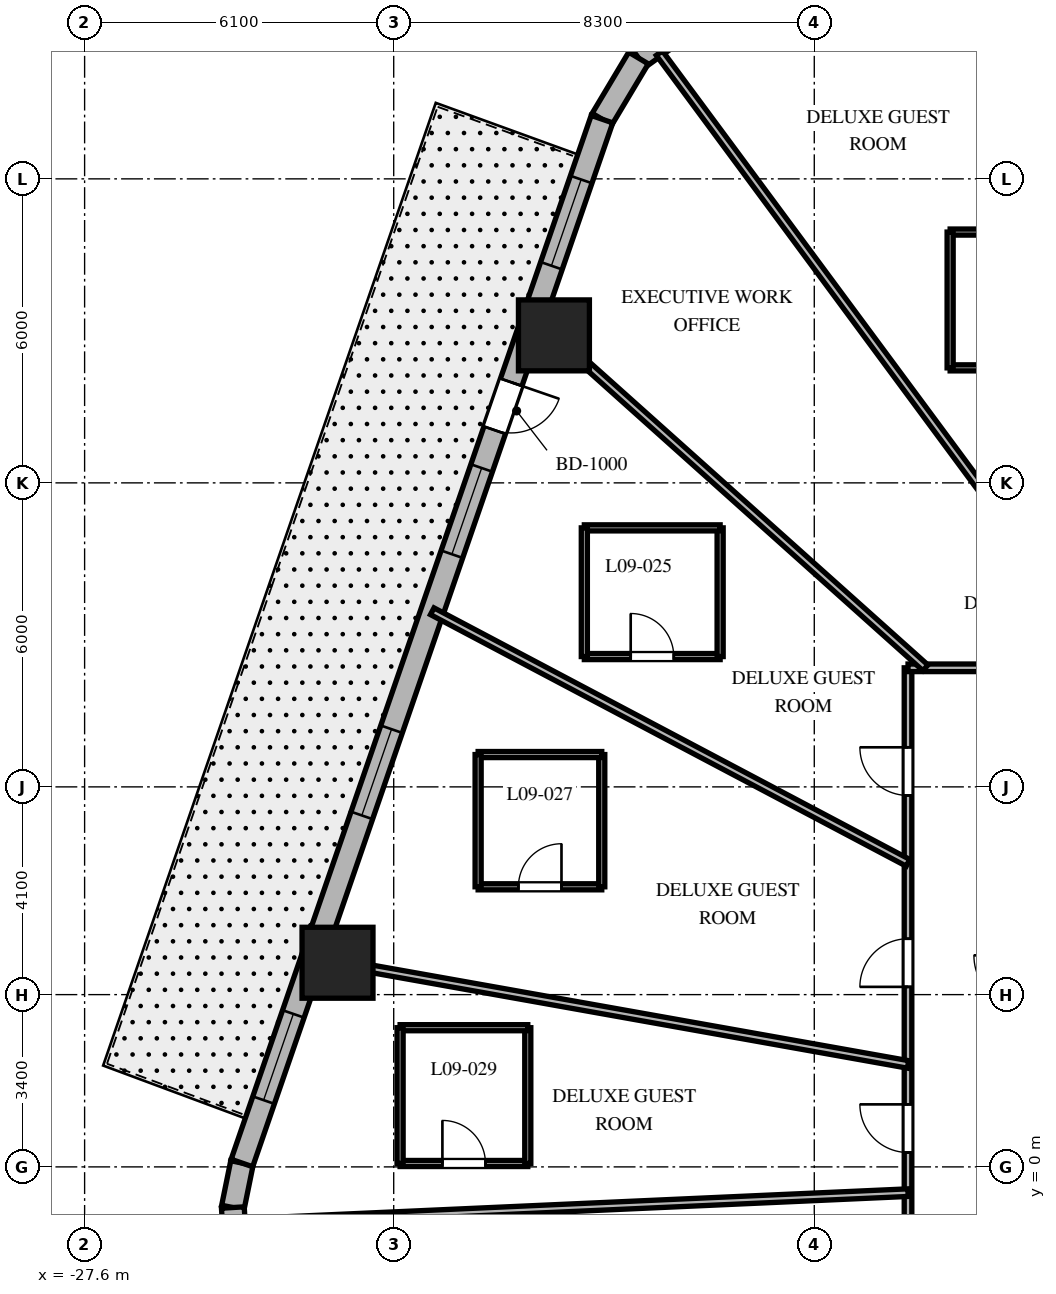
"""IFC4 building model, lengths in metres.
Left out: names, types, materials, properties, quantities, classifications, styles, units other than length and angle.
Written with IfcOpenShell. Run it as: python <this file> out.ifc"""

import sys

from ifc_helpers import new_model, si_unit, direction, frame, frame_2d, origin, origin_2d, place, context, subcontext, project, spatial, rectangle, extrude, element, fill, save


model = new_model("IFC4")
c1 = context("Model", 3, precision=1e-05, world=origin(), true_north=direction((0.0, 1.0)))
c2 = subcontext(c1, "Body", "Model", "MODEL_VIEW")
j1 = project(units=[si_unit("LENGTHUNIT", "METRE"), si_unit("PLANEANGLEUNIT", "RADIAN")], contexts=[c1])
p1 = place(None, origin())
s1 = spatial("IfcSite", under=j1, at=p1, CompositionType="ELEMENT")
p2 = place(p1, origin())
s2 = spatial("IfcBuilding", under=s1, at=p2, CompositionType="ELEMENT")
p3 = place(p2, frame((0.0, 0.0, 45.3)))
s3 = spatial("IfcBuildingStorey", under=s2, at=p3, CompositionType="ELEMENT", Elevation=45.3)
for number, where, z_axis, x_axis in (
    (1, (-18.338, 16.411, 0.0), (0.0, 0.0, 1.0), (1.0, 0.0, 0.0)),
    (2, (-22.609, 4.029, 0.0), (0.0, 0.0, 1.0), (1.0, 0.0, 0.0)),
):
    element("IfcColumn", number, at=place(p3, frame(where, z_axis=z_axis, x_axis=x_axis)), inside=s3, PredefinedType="COLUMN", context=c2, shape_type="SweptSolid", body=[
        extrude(rectangle(XDim=1.4, YDim=1.4, at=origin_2d()), origin(), (0.0, 0.0, 1.0), 3.7),
    ])
p4 = place(p3, frame((-15.544, 22.687, 0.0), z_axis=(0.0, 0.0, 1.0), x_axis=(-0.814210854316, -0.580569276412, 0.0)))
e3 = element("IfcWall", 3, at=p4, inside=s3, PredefinedType="SOLIDWALL", context=c2, shape_type="SweptSolid", body=[
    extrude(rectangle(XDim=1.381, YDim=0.45, at=frame_2d((0.691, 0.0))), origin(), (0.0, 0.0, 1.0), 3.4),
])
p5 = place(p3, frame((-16.669, 21.885, 0.0), z_axis=(0.0, 0.0, 1.0), x_axis=(-0.512936712947, -0.858426425799, 0.0)))
e4 = element("IfcWall", 4, at=p5, inside=s3, PredefinedType="SOLIDWALL", context=c2, shape_type="SweptSolid", body=[
    extrude(rectangle(XDim=1.406, YDim=0.45, at=frame_2d((0.703, 0.0))), origin(), (0.0, 0.0, 1.0), 3.4),
])
p6 = place(p3, frame((-24.496, 0.077, 0.0), z_axis=(0.0, 0.0, 1.0), x_axis=(-0.199570594521, -0.979883451132, 0.0)))
e5 = element("IfcWall", 5, at=p6, inside=s3, PredefinedType="SOLIDWALL", context=c2, shape_type="SweptSolid", body=[
    extrude(rectangle(XDim=0.897, YDim=0.45, at=frame_2d((0.448, 0.0))), origin(), (0.0, 0.0, 1.0), 3.4),
])
p7 = place(p3, frame((-24.675, -0.802, 0.0), z_axis=(0.0, 0.0, 1.0), x_axis=(0.061188874166, -0.998126205286, 0.0)))
e6 = element("IfcWall", 6, at=p7, inside=s3, PredefinedType="SOLIDWALL", context=c2, shape_type="SweptSolid", body=[
    extrude(rectangle(XDim=0.882, YDim=0.45, at=frame_2d((0.441, 0.0))), origin(), (0.0, 0.0, 1.0), 3.4),
])
p8 = place(p3, frame((-17.39, 20.678, 0.0), z_axis=(0.0, 0.0, 1.0), x_axis=(-0.326068018294, -0.945346310854, 0.0)))
e7 = element("IfcWall", 7, at=p8, inside=s3, PredefinedType="SOLIDWALL", context=c2, shape_type="SweptSolid", body=[
    extrude(rectangle(XDim=21.793, YDim=0.45, at=frame_2d((10.896, 0.0))), origin(), (0.0, 0.0, 1.0), 3.4),
])
p9 = place(p8, frame((5.493, 0.0, 0.0)))
e8 = element("IfcOpeningElement", 8, at=p9, cuts=e7, PredefinedType="OPENING", context=c2, shape_type="SweptSolid", body=[
    extrude(rectangle(XDim=1.0, YDim=2.15, at=frame_2d((0.5, 1.075))), frame((0.0, 0.235, 0.0), z_axis=(0.0, -1.0, 0.0), x_axis=(1.0, 0.0, 0.0)), (0.0, 0.0, 1.0), 0.47),
])
p10 = place(p8, frame((1.26, 0.0, 0.8)))
e9 = element("IfcOpeningElement", 9, at=p10, cuts=e7, PredefinedType="OPENING", context=c2, shape_type="SweptSolid", body=[
    extrude(rectangle(XDim=1.8, YDim=1.8, at=frame_2d((0.9, 0.9))), frame((0.0, 0.235, 0.0), z_axis=(0.0, -1.0, 0.0), x_axis=(1.0, 0.0, 0.0)), (0.0, 0.0, 1.0), 0.47),
])
p11 = place(p8, frame((7.283, 0.0, 0.8)))
e10 = element("IfcOpeningElement", 10, at=p11, cuts=e7, PredefinedType="OPENING", context=c2, shape_type="SweptSolid", body=[
    extrude(rectangle(XDim=1.8, YDim=1.8, at=frame_2d((0.9, 0.9))), frame((0.0, 0.235, 0.0), z_axis=(0.0, -1.0, 0.0), x_axis=(1.0, 0.0, 0.0)), (0.0, 0.0, 1.0), 0.47),
])
p12 = place(p8, frame((12.736, 0.0, 0.8)))
e11 = element("IfcOpeningElement", 11, at=p12, cuts=e7, PredefinedType="OPENING", context=c2, shape_type="SweptSolid", body=[
    extrude(rectangle(XDim=1.8, YDim=1.8, at=frame_2d((0.9, 0.9))), frame((0.0, 0.235, 0.0), z_axis=(0.0, -1.0, 0.0), x_axis=(1.0, 0.0, 0.0)), (0.0, 0.0, 1.0), 0.47),
])
p13 = place(p8, frame((18.68, 0.0, 0.8)))
e12 = element("IfcOpeningElement", 12, at=p13, cuts=e7, PredefinedType="OPENING", context=c2, shape_type="SweptSolid", body=[
    extrude(rectangle(XDim=1.8, YDim=1.8, at=frame_2d((0.9, 0.9))), frame((0.0, 0.235, 0.0), z_axis=(0.0, -1.0, 0.0), x_axis=(1.0, 0.0, 0.0)), (0.0, 0.0, 1.0), 0.47),
])
p14 = place(p3, frame((-11.35, -9.85, 0.0), z_axis=(0.0, 0.0, 1.0), x_axis=(0.0, 1.0, 0.0)))
e13 = element("IfcWall", 13, at=p14, inside=s3, PredefinedType="PARTITIONING", context=c2, shape_type="SweptSolid", body=[
    extrude(rectangle(XDim=19.7, YDim=0.15, at=frame_2d((9.85, 0.0))), origin(), (0.0, 0.0, 1.0), 2.84),
])
p15 = place(p14, frame((17.181, 0.0, 0.0)))
e14 = element("IfcOpeningElement", 14, at=p15, cuts=e13, PredefinedType="OPENING", context=c2, shape_type="SweptSolid", body=[
    extrude(rectangle(XDim=0.95, YDim=2.03, at=frame_2d((0.475, 1.015))), frame((0.0, 0.085, 0.0), z_axis=(0.0, -1.0, 0.0), x_axis=(1.0, 0.0, 0.0)), (0.0, 0.0, 1.0), 0.17),
])
p16 = place(p14, frame((13.403, 0.0, 0.0)))
e15 = element("IfcOpeningElement", 15, at=p16, cuts=e13, PredefinedType="OPENING", context=c2, shape_type="SweptSolid", body=[
    extrude(rectangle(XDim=0.95, YDim=2.03, at=frame_2d((0.475, 1.015))), frame((0.0, 0.085, 0.0), z_axis=(0.0, -1.0, 0.0), x_axis=(1.0, 0.0, 0.0)), (0.0, 0.0, 1.0), 0.17),
])
p17 = place(p14, frame((10.134, 0.0, 0.0)))
e16 = element("IfcOpeningElement", 16, at=p17, cuts=e13, PredefinedType="OPENING", context=c2, shape_type="SweptSolid", body=[
    extrude(rectangle(XDim=0.95, YDim=2.03, at=frame_2d((0.475, 1.015))), frame((0.0, 0.085, 0.0), z_axis=(0.0, -1.0, 0.0), x_axis=(1.0, 0.0, 0.0)), (0.0, 0.0, 1.0), 0.17),
])
p18 = place(p14, frame((7.571, 0.0, 0.0)))
e17 = element("IfcOpeningElement", 17, at=p18, cuts=e13, PredefinedType="OPENING", context=c2, shape_type="SweptSolid", body=[
    extrude(rectangle(XDim=0.95, YDim=2.03, at=frame_2d((0.475, 1.015))), frame((0.0, 0.085, 0.0), z_axis=(0.0, -1.0, 0.0), x_axis=(1.0, 0.0, 0.0)), (0.0, 0.0, 1.0), 0.17),
])
p19 = place(p14, frame((3.024, 0.0, 0.0)))
e18 = element("IfcOpeningElement", 18, at=p19, cuts=e13, PredefinedType="OPENING", context=c2, shape_type="SweptSolid", body=[
    extrude(rectangle(XDim=0.95, YDim=2.03, at=frame_2d((0.475, 1.015))), frame((0.0, 0.085, 0.0), z_axis=(0.0, -1.0, 0.0), x_axis=(1.0, 0.0, 0.0)), (0.0, 0.0, 1.0), 0.17),
])
p20 = place(p3, frame((-11.35, 9.85, 0.0), z_axis=(0.0, 0.0, 1.0), x_axis=(1.0, 0.0, 0.0)))
e19 = element("IfcWall", 19, at=p20, inside=s3, PredefinedType="PARTITIONING", context=c2, shape_type="SweptSolid", body=[
    extrude(rectangle(XDim=22.7, YDim=0.15, at=frame_2d((11.35, 0.0))), origin(), (0.0, 0.0, 1.0), 2.84),
])
p21 = place(p20, frame((18.837, 0.0, 0.0)))
e20 = element("IfcOpeningElement", 20, at=p21, cuts=e19, PredefinedType="OPENING", context=c2, shape_type="SweptSolid", body=[
    extrude(rectangle(XDim=0.9, YDim=2.03, at=frame_2d((0.45, 1.015))), frame((0.0, 0.085, 0.0), z_axis=(0.0, -1.0, 0.0), x_axis=(1.0, 0.0, 0.0)), (0.0, 0.0, 1.0), 0.17),
])
p22 = place(p20, frame((15.532, 0.0, 0.0)))
e21 = element("IfcOpeningElement", 21, at=p22, cuts=e19, PredefinedType="OPENING", context=c2, shape_type="SweptSolid", body=[
    extrude(rectangle(XDim=0.95, YDim=2.03, at=frame_2d((0.475, 1.015))), frame((0.0, 0.085, 0.0), z_axis=(0.0, -1.0, 0.0), x_axis=(1.0, 0.0, 0.0)), (0.0, 0.0, 1.0), 0.17),
])
p23 = place(p20, frame((10.444, 0.0, 0.0)))
e22 = element("IfcOpeningElement", 22, at=p23, cuts=e19, PredefinedType="OPENING", context=c2, shape_type="SweptSolid", body=[
    extrude(rectangle(XDim=0.95, YDim=2.03, at=frame_2d((0.475, 1.015))), frame((0.0, 0.085, 0.0), z_axis=(0.0, -1.0, 0.0), x_axis=(1.0, 0.0, 0.0)), (0.0, 0.0, 1.0), 0.17),
])
p24 = place(p20, frame((5.252, 0.0, 0.0)))
e23 = element("IfcOpeningElement", 23, at=p24, cuts=e19, PredefinedType="OPENING", context=c2, shape_type="SweptSolid", body=[
    extrude(rectangle(XDim=0.95, YDim=2.03, at=frame_2d((0.475, 1.015))), frame((0.0, 0.085, 0.0), z_axis=(0.0, -1.0, 0.0), x_axis=(1.0, 0.0, 0.0)), (0.0, 0.0, 1.0), 0.17),
])
p25 = place(p20, frame((1.702, 0.0, 0.0)))
e24 = element("IfcOpeningElement", 24, at=p25, cuts=e19, PredefinedType="OPENING", context=c2, shape_type="SweptSolid", body=[
    extrude(rectangle(XDim=0.9, YDim=2.03, at=frame_2d((0.45, 1.015))), frame((0.0, 0.085, 0.0), z_axis=(0.0, -1.0, 0.0), x_axis=(1.0, 0.0, 0.0)), (0.0, 0.0, 1.0), 0.17),
])
p26 = place(p3, frame((-7.285, 9.85, 0.0), z_axis=(0.0, 0.0, 1.0), x_axis=(-0.594630332275, 0.803999233792, 0.0)))
e25 = element("IfcWall", 25, at=p26, inside=s3, PredefinedType="PARTITIONING", context=c2, shape_type="SweptSolid", body=[
    extrude(rectangle(XDim=15.089, YDim=0.15, at=frame_2d((7.544, 0.0))), origin(), (0.0, 0.0, 1.0), 2.54),
])
p27 = place(p3, frame((-11.007, 9.85, 0.0), z_axis=(0.0, 0.0, 1.0), x_axis=(-0.745177305978, 0.666866390407, 0.0)))
e26 = element("IfcWall", 26, at=p27, inside=s3, PredefinedType="PARTITIONING", context=c2, shape_type="SweptSolid", body=[
    extrude(rectangle(XDim=10.375, YDim=0.15, at=frame_2d((5.188, 0.0))), origin(), (0.0, 0.0, 1.0), 2.54),
])
p28 = place(p3, frame((-11.35, 6.001, 0.0), z_axis=(0.0, 0.0, 1.0), x_axis=(-0.884022077319, 0.467445148453, 0.0)))
e27 = element("IfcWall", 27, at=p28, inside=s3, PredefinedType="PARTITIONING", context=c2, shape_type="SweptSolid", body=[
    extrude(rectangle(XDim=10.621, YDim=0.15, at=frame_2d((5.311, 0.0))), origin(), (0.0, 0.0, 1.0), 2.54),
])
p29 = place(p3, frame((-11.35, 2.023, 0.0), z_axis=(0.0, 0.0, 1.0), x_axis=(-0.984493741877, 0.17541970301, 0.0)))
e28 = element("IfcWall", 28, at=p29, inside=s3, PredefinedType="PARTITIONING", context=c2, shape_type="SweptSolid", body=[
    extrude(rectangle(XDim=11.937, YDim=0.15, at=frame_2d((5.969, 0.0))), origin(), (0.0, 0.0, 1.0), 2.54),
])
p30 = place(p3, frame((-11.35, -0.508, 0.0), z_axis=(0.0, 0.0, 1.0), x_axis=(-0.998998237556, -0.044749540337, 0.0)))
e29 = element("IfcWall", 29, at=p30, inside=s3, PredefinedType="PARTITIONING", context=c2, shape_type="SweptSolid", body=[
    extrude(rectangle(XDim=13.159, YDim=0.15, at=frame_2d((6.58, 0.0))), origin(), (0.0, 0.0, 1.0), 2.54),
])
p31 = place(p3, frame((-10.519, 15.77, 0.0), z_axis=(0.0, 0.0, 1.0), x_axis=(1.0, 0.0, 0.0)))
e30 = element("IfcWall", 30, at=p31, inside=s3, PredefinedType="PARTITIONING", context=c2, shape_type="SweptSolid", body=[
    extrude(rectangle(XDim=2.52, YDim=0.12, at=frame_2d((1.26, 0.0))), origin(), (0.0, 0.0, 1.0), 2.84),
])
p32 = place(p31, frame((0.835, 0.0, 0.0)))
e31 = element("IfcOpeningElement", 31, at=p32, cuts=e30, PredefinedType="OPENING", context=c2, shape_type="SweptSolid", body=[
    extrude(rectangle(XDim=0.85, YDim=2.03, at=frame_2d((0.425, 1.015))), frame((0.0, 0.07, 0.0), z_axis=(0.0, -1.0, 0.0), x_axis=(1.0, 0.0, 0.0)), (0.0, 0.0, 1.0), 0.14),
])
p33 = place(p3, frame((-7.999, 18.45, 0.0), z_axis=(0.0, 0.0, 1.0), x_axis=(-1.0, 0.0, 0.0)))
e32 = element("IfcWall", 32, at=p33, inside=s3, PredefinedType="PARTITIONING", context=c2, shape_type="SweptSolid", body=[
    extrude(rectangle(XDim=2.52, YDim=0.12, at=frame_2d((1.26, 0.0))), origin(), (0.0, 0.0, 1.0), 2.84),
])
p34 = place(p3, frame((-10.519, 18.45, 0.0), z_axis=(0.0, 0.0, 1.0), x_axis=(0.0, -1.0, 0.0)))
e33 = element("IfcWall", 33, at=p34, inside=s3, PredefinedType="PARTITIONING", context=c2, shape_type="SweptSolid", body=[
    extrude(rectangle(XDim=2.68, YDim=0.12, at=frame_2d((1.34, 0.0))), origin(), (0.0, 0.0, 1.0), 2.927),
])
p35 = place(p3, frame((-17.738, 10.072, 0.0), z_axis=(0.0, 0.0, 1.0), x_axis=(1.0, 0.0, 0.0)))
e34 = element("IfcWall", 34, at=p35, inside=s3, PredefinedType="PARTITIONING", context=c2, shape_type="SweptSolid", body=[
    extrude(rectangle(XDim=2.68, YDim=0.12, at=frame_2d((1.34, 0.0))), origin(), (0.0, 0.0, 1.0), 2.972),
])
p36 = place(p35, frame((0.915, 0.0, 0.0)))
e35 = element("IfcOpeningElement", 35, at=p36, cuts=e34, PredefinedType="OPENING", context=c2, shape_type="SweptSolid", body=[
    extrude(rectangle(XDim=0.85, YDim=2.03, at=frame_2d((0.425, 1.015))), frame((0.0, 0.07, 0.0), z_axis=(0.0, -1.0, 0.0), x_axis=(1.0, 0.0, 0.0)), (0.0, 0.0, 1.0), 0.14),
])
p37 = place(p3, frame((-15.058, 10.072, 0.0), z_axis=(0.0, 0.0, 1.0), x_axis=(0.0, 1.0, 0.0)))
e36 = element("IfcWall", 36, at=p37, inside=s3, PredefinedType="PARTITIONING", context=c2, shape_type="SweptSolid", body=[
    extrude(rectangle(XDim=2.54, YDim=0.12, at=frame_2d((1.27, 0.0))), origin(), (0.0, 0.0, 1.0), 3.4),
])
p38 = place(p3, frame((-15.058, 12.612, 0.0), z_axis=(0.0, 0.0, 1.0), x_axis=(-1.0, 0.0, 0.0)))
e37 = element("IfcWall", 37, at=p38, inside=s3, PredefinedType="PARTITIONING", context=c2, shape_type="SweptSolid", body=[
    extrude(rectangle(XDim=2.68, YDim=0.12, at=frame_2d((1.34, 0.0))), origin(), (0.0, 0.0, 1.0), 2.972),
])
p39 = place(p3, frame((-17.738, 12.612, 0.0), z_axis=(0.0, 0.0, 1.0), x_axis=(0.0, -1.0, 0.0)))
e38 = element("IfcWall", 38, at=p39, inside=s3, PredefinedType="PARTITIONING", context=c2, shape_type="SweptSolid", body=[
    extrude(rectangle(XDim=2.54, YDim=0.12, at=frame_2d((1.27, 0.0))), origin(), (0.0, 0.0, 1.0), 3.4),
])
p40 = place(p3, frame((-19.834, 5.528, 0.0), z_axis=(0.0, 0.0, 1.0), x_axis=(1.0, 0.0, 0.0)))
e39 = element("IfcWall", 39, at=p40, inside=s3, PredefinedType="PARTITIONING", context=c2, shape_type="SweptSolid", body=[
    extrude(rectangle(XDim=2.44, YDim=0.12, at=frame_2d((1.22, 0.0))), origin(), (0.0, 0.0, 1.0), 2.84),
])
p41 = place(p40, frame((0.795, 0.0, 0.0)))
e40 = element("IfcOpeningElement", 40, at=p41, cuts=e39, PredefinedType="OPENING", context=c2, shape_type="SweptSolid", body=[
    extrude(rectangle(XDim=0.85, YDim=2.03, at=frame_2d((0.425, 1.015))), frame((0.0, 0.07, 0.0), z_axis=(0.0, -1.0, 0.0), x_axis=(1.0, 0.0, 0.0)), (0.0, 0.0, 1.0), 0.14),
])
p42 = place(p3, frame((-17.394, 5.528, 0.0), z_axis=(0.0, 0.0, 1.0), x_axis=(0.0, 1.0, 0.0)))
e41 = element("IfcWall", 41, at=p42, inside=s3, PredefinedType="PARTITIONING", context=c2, shape_type="SweptSolid", body=[
    extrude(rectangle(XDim=2.61, YDim=0.12, at=frame_2d((1.305, 0.0))), origin(), (0.0, 0.0, 1.0), 2.972),
])
p43 = place(p3, frame((-17.394, 8.138, 0.0), z_axis=(0.0, 0.0, 1.0), x_axis=(-1.0, 0.0, 0.0)))
e42 = element("IfcWall", 42, at=p43, inside=s3, PredefinedType="PARTITIONING", context=c2, shape_type="SweptSolid", body=[
    extrude(rectangle(XDim=2.44, YDim=0.12, at=frame_2d((1.22, 0.0))), origin(), (0.0, 0.0, 1.0), 3.4),
])
p44 = place(p3, frame((-19.834, 8.138, 0.0), z_axis=(0.0, 0.0, 1.0), x_axis=(0.0, -1.0, 0.0)))
e43 = element("IfcWall", 43, at=p44, inside=s3, PredefinedType="PARTITIONING", context=c2, shape_type="SweptSolid", body=[
    extrude(rectangle(XDim=2.61, YDim=0.12, at=frame_2d((1.305, 0.0))), origin(), (0.0, 0.0, 1.0), 3.4),
])
p45 = place(p3, frame((-21.374, 0.067, 0.0), z_axis=(0.0, 0.0, 1.0), x_axis=(1.0, 0.0, 0.0)))
e44 = element("IfcWall", 44, at=p45, inside=s3, PredefinedType="PARTITIONING", context=c2, shape_type="SweptSolid", body=[
    extrude(rectangle(XDim=2.52, YDim=0.12, at=frame_2d((1.26, 0.0))), origin(), (0.0, 0.0, 1.0), 3.4),
])
p46 = place(p45, frame((0.835, 0.0, 0.0)))
e45 = element("IfcOpeningElement", 45, at=p46, cuts=e44, PredefinedType="OPENING", context=c2, shape_type="SweptSolid", body=[
    extrude(rectangle(XDim=0.85, YDim=2.03, at=frame_2d((0.425, 1.015))), frame((0.0, 0.07, 0.0), z_axis=(0.0, -1.0, 0.0), x_axis=(1.0, 0.0, 0.0)), (0.0, 0.0, 1.0), 0.14),
])
p47 = place(p3, frame((-18.854, 0.067, 0.0), z_axis=(0.0, 0.0, 1.0), x_axis=(0.0, 1.0, 0.0)))
e46 = element("IfcWall", 46, at=p47, inside=s3, PredefinedType="PARTITIONING", context=c2, shape_type="SweptSolid", body=[
    extrude(rectangle(XDim=2.68, YDim=0.12, at=frame_2d((1.34, 0.0))), origin(), (0.0, 0.0, 1.0), 3.4),
])
p48 = place(p3, frame((-18.854, 2.747, 0.0), z_axis=(0.0, 0.0, 1.0), x_axis=(-1.0, 0.0, 0.0)))
e47 = element("IfcWall", 47, at=p48, inside=s3, PredefinedType="PARTITIONING", context=c2, shape_type="SweptSolid", body=[
    extrude(rectangle(XDim=2.52, YDim=0.12, at=frame_2d((1.26, 0.0))), origin(), (0.0, 0.0, 1.0), 3.4),
])
p49 = place(p3, frame((-21.374, 2.747, 0.0), z_axis=(0.0, 0.0, 1.0), x_axis=(0.0, -1.0, 0.0)))
e48 = element("IfcWall", 48, at=p49, inside=s3, PredefinedType="PARTITIONING", context=c2, shape_type="SweptSolid", body=[
    extrude(rectangle(XDim=2.68, YDim=0.12, at=frame_2d((1.34, 0.0))), origin(), (0.0, 0.0, 1.0), 3.4),
])
p50 = place(p9, origin())
e49 = element("IfcDoor", 49, at=p50, inside=s3, OperationType="SINGLE_SWING_LEFT", PredefinedType="DOOR", context=c2, shape_type="SweptSolid", body=[
    extrude(rectangle(XDim=1.0, YDim=2.15, at=frame_2d((0.5, 1.075))), frame((0.0, 0.025, 0.0), z_axis=(0.0, -1.0, 0.0), x_axis=(1.0, 0.0, 0.0)), (0.0, 0.0, 1.0), 0.05),
])
fill(e8, e49)
p51 = place(p10, origin())
e50 = element("IfcWindow", 50, at=p51, inside=s3, PartitioningType="SINGLE_PANEL", PredefinedType="WINDOW", context=c2, shape_type="SweptSolid", body=[
    extrude(rectangle(XDim=1.8, YDim=1.8, at=frame_2d((0.9, 0.9))), frame((0.0, 0.03, 0.0), z_axis=(0.0, -1.0, 0.0), x_axis=(1.0, 0.0, 0.0)), (0.0, 0.0, 1.0), 0.06),
])
fill(e9, e50)
p52 = place(p11, origin())
e51 = element("IfcWindow", 51, at=p52, inside=s3, PartitioningType="SINGLE_PANEL", PredefinedType="WINDOW", context=c2, shape_type="SweptSolid", body=[
    extrude(rectangle(XDim=1.8, YDim=1.8, at=frame_2d((0.9, 0.9))), frame((0.0, 0.03, 0.0), z_axis=(0.0, -1.0, 0.0), x_axis=(1.0, 0.0, 0.0)), (0.0, 0.0, 1.0), 0.06),
])
fill(e10, e51)
p53 = place(p12, origin())
e52 = element("IfcWindow", 52, at=p53, inside=s3, PartitioningType="SINGLE_PANEL", PredefinedType="WINDOW", context=c2, shape_type="SweptSolid", body=[
    extrude(rectangle(XDim=1.8, YDim=1.8, at=frame_2d((0.9, 0.9))), frame((0.0, 0.03, 0.0), z_axis=(0.0, -1.0, 0.0), x_axis=(1.0, 0.0, 0.0)), (0.0, 0.0, 1.0), 0.06),
])
fill(e11, e52)
p54 = place(p13, origin())
e53 = element("IfcWindow", 53, at=p54, inside=s3, PartitioningType="SINGLE_PANEL", PredefinedType="WINDOW", context=c2, shape_type="SweptSolid", body=[
    extrude(rectangle(XDim=1.8, YDim=1.8, at=frame_2d((0.9, 0.9))), frame((0.0, 0.03, 0.0), z_axis=(0.0, -1.0, 0.0), x_axis=(1.0, 0.0, 0.0)), (0.0, 0.0, 1.0), 0.06),
])
fill(e12, e53)
p55 = place(p15, origin())
e54 = element("IfcDoor", 54, at=p55, inside=s3, OperationType="SINGLE_SWING_RIGHT", PredefinedType="DOOR", context=c2, shape_type="SweptSolid", body=[
    extrude(rectangle(XDim=0.95, YDim=2.03, at=frame_2d((0.475, 1.015))), frame((0.0, 0.025, 0.0), z_axis=(0.0, -1.0, 0.0), x_axis=(1.0, 0.0, 0.0)), (0.0, 0.0, 1.0), 0.05),
])
fill(e14, e54)
p56 = place(p36, origin())
e55 = element("IfcDoor", 55, at=p56, inside=s3, OperationType="SINGLE_SWING_LEFT", PredefinedType="DOOR", context=c2, shape_type="SweptSolid", body=[
    extrude(rectangle(XDim=0.85, YDim=2.03, at=frame_2d((0.425, 1.015))), frame((0.0, 0.025, 0.0), z_axis=(0.0, -1.0, 0.0), x_axis=(1.0, 0.0, 0.0)), (0.0, 0.0, 1.0), 0.05),
])
fill(e35, e55)
p57 = place(p16, origin())
e56 = element("IfcDoor", 56, at=p57, inside=s3, OperationType="SINGLE_SWING_LEFT", PredefinedType="DOOR", context=c2, shape_type="SweptSolid", body=[
    extrude(rectangle(XDim=0.95, YDim=2.03, at=frame_2d((0.475, 1.015))), frame((0.0, 0.025, 0.0), z_axis=(0.0, -1.0, 0.0), x_axis=(1.0, 0.0, 0.0)), (0.0, 0.0, 1.0), 0.05),
])
fill(e15, e56)
p58 = place(p41, origin())
e57 = element("IfcDoor", 57, at=p58, inside=s3, OperationType="SINGLE_SWING_RIGHT", PredefinedType="DOOR", context=c2, shape_type="SweptSolid", body=[
    extrude(rectangle(XDim=0.85, YDim=2.03, at=frame_2d((0.425, 1.015))), frame((0.0, 0.025, 0.0), z_axis=(0.0, -1.0, 0.0), x_axis=(1.0, 0.0, 0.0)), (0.0, 0.0, 1.0), 0.05),
])
fill(e40, e57)
p59 = place(p17, origin())
e58 = element("IfcDoor", 58, at=p59, inside=s3, OperationType="SINGLE_SWING_RIGHT", PredefinedType="DOOR", context=c2, shape_type="SweptSolid", body=[
    extrude(rectangle(XDim=0.95, YDim=2.03, at=frame_2d((0.475, 1.015))), frame((0.0, 0.025, 0.0), z_axis=(0.0, -1.0, 0.0), x_axis=(1.0, 0.0, 0.0)), (0.0, 0.0, 1.0), 0.05),
])
fill(e16, e58)
p60 = place(p46, origin())
e59 = element("IfcDoor", 59, at=p60, inside=s3, OperationType="SINGLE_SWING_LEFT", PredefinedType="DOOR", context=c2, shape_type="SweptSolid", body=[
    extrude(rectangle(XDim=0.85, YDim=2.03, at=frame_2d((0.425, 1.015))), frame((0.0, 0.025, 0.0), z_axis=(0.0, -1.0, 0.0), x_axis=(1.0, 0.0, 0.0)), (0.0, 0.0, 1.0), 0.05),
])
fill(e45, e59)
save(model, sys.argv[1])
